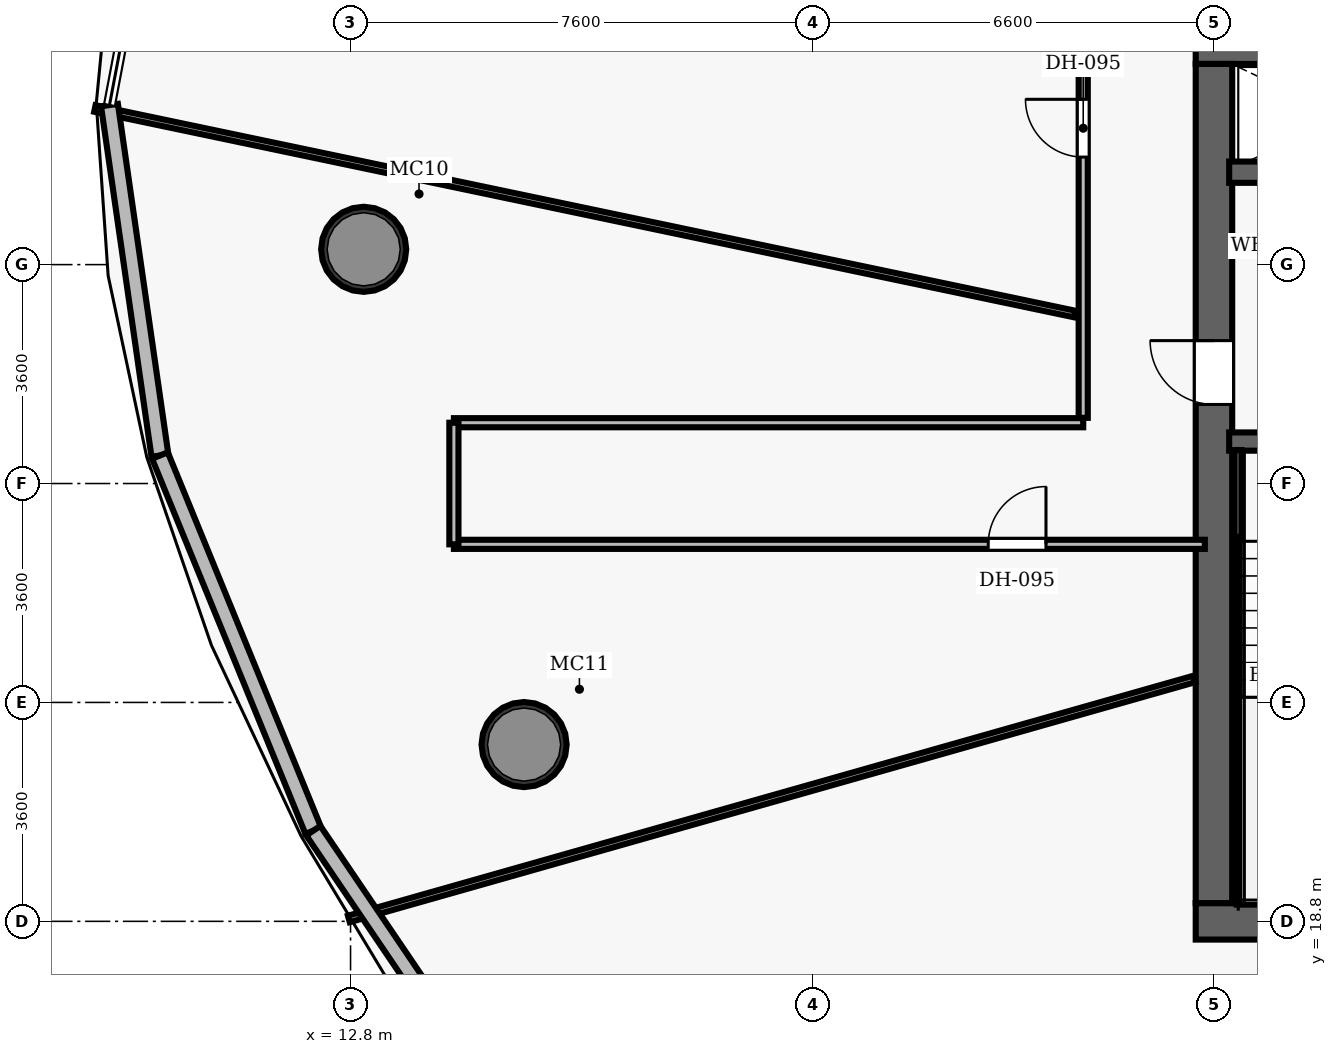
"""IFC4 building model, lengths in metres.
Left out: names, types, materials, properties, quantities, classifications, styles, units other than length and angle.
Written with IfcOpenShell. Run it as: python <this file> out.ifc"""

import sys

from ifc_helpers import new_model, si_unit, direction, frame, frame_2d, origin, origin_2d, place, context, subcontext, project, spatial, rectangle, hollow_circle, extrude, element, fill, save


model = new_model("IFC4")
c1 = context("Model", 3, precision=1e-05, world=origin(), true_north=direction((0.0, 1.0)))
c2 = subcontext(c1, "Body", "Model", "MODEL_VIEW")
j1 = project(units=[si_unit("LENGTHUNIT", "METRE"), si_unit("PLANEANGLEUNIT", "RADIAN")], contexts=[c1])
p1 = place(None, origin())
s1 = spatial("IfcSite", under=j1, at=p1, CompositionType="ELEMENT")
p2 = place(p1, origin())
s2 = spatial("IfcBuilding", under=s1, at=p2, CompositionType="ELEMENT")
p3 = place(p2, frame((0.0, 0.0, 120.3)))
s3 = spatial("IfcBuildingStorey", under=s2, at=p3, CompositionType="ELEMENT", Elevation=120.3)
p4 = place(p3, frame((26.7, 18.8, 0.0), z_axis=(0.0, 0.0, 1.0), x_axis=(1.0, 0.0, 0.0)))
e1 = element("IfcWall", 1, at=p4, inside=s3, PredefinedType="SHEAR", context=c2, shape_type="SweptSolid", body=[
    extrude(rectangle(XDim=22.6, YDim=0.6, at=frame_2d((11.3, 0.0))), origin(), (0.0, 0.0, 1.0), 3.5),
])
p5 = place(p4, frame((14.52, 0.0, 0.0)))
e2 = element("IfcOpeningElement", 2, at=p5, cuts=e1, PredefinedType="OPENING", context=c2, shape_type="SweptSolid", body=[
    extrude(rectangle(XDim=1.05, YDim=2.15, at=frame_2d((0.525, 1.075))), frame((0.0, 0.31, 0.0), z_axis=(0.0, -1.0, 0.0), x_axis=(1.0, 0.0, 0.0)), (0.0, 0.0, 1.0), 0.62),
])
p6 = place(p3, frame((26.7, 33.2, 0.0), z_axis=(0.0, 0.0, 1.0), x_axis=(1.0, 0.0, 0.0)))
e3 = element("IfcWall", 3, at=p6, inside=s3, PredefinedType="SHEAR", context=c2, shape_type="SweptSolid", body=[
    extrude(rectangle(XDim=22.6, YDim=0.6, at=frame_2d((11.3, 0.0))), origin(), (0.0, 0.0, 1.0), 3.5),
])
p7 = place(p6, frame((4.62, 0.0, 0.0)))
e4 = element("IfcOpeningElement", 4, at=p7, cuts=e3, PredefinedType="OPENING", context=c2, shape_type="SweptSolid", body=[
    extrude(rectangle(XDim=1.05, YDim=2.15, at=frame_2d((0.525, 1.075))), frame((0.0, 0.31, 0.0), z_axis=(0.0, -1.0, 0.0), x_axis=(1.0, 0.0, 0.0)), (0.0, 0.0, 1.0), 0.62),
])
p8 = place(p6, frame((14.52, 0.0, 0.0)))
e5 = element("IfcOpeningElement", 5, at=p8, cuts=e3, PredefinedType="OPENING", context=c2, shape_type="SweptSolid", body=[
    extrude(rectangle(XDim=1.05, YDim=2.15, at=frame_2d((0.525, 1.075))), frame((0.0, 0.31, 0.0), z_axis=(0.0, -1.0, 0.0), x_axis=(1.0, 0.0, 0.0)), (0.0, 0.0, 1.0), 0.62),
])
p9 = place(p3, frame((27.0, 19.1, 0.0), z_axis=(0.0, 0.0, 1.0), x_axis=(0.0, 1.0, 0.0)))
e6 = element("IfcWall", 6, at=p9, inside=s3, PredefinedType="SHEAR", context=c2, shape_type="SweptSolid", body=[
    extrude(rectangle(XDim=13.8, YDim=0.6, at=frame_2d((6.9, 0.0))), origin(), (0.0, 0.0, 1.0), 3.5),
])
p10 = place(p9, frame((8.2, 0.0, 0.0)))
e7 = element("IfcOpeningElement", 7, at=p10, cuts=e6, PredefinedType="OPENING", context=c2, shape_type="SweptSolid", body=[
    extrude(rectangle(XDim=1.05, YDim=2.15, at=frame_2d((0.525, 1.075))), frame((0.0, 0.31, 0.0), z_axis=(0.0, -1.0, 0.0), x_axis=(1.0, 0.0, 0.0)), (0.0, 0.0, 1.0), 0.62),
])
for number, where, z_axis, x_axis in (
    (8, (13.016, 29.852, 0.0), (0.0, 0.0, 1.0), (1.0, 0.0, 0.0)),
    (9, (15.654, 21.707, 0.0), (0.0, 0.0, 1.0), (1.0, 0.0, 0.0)),
):
    element("IfcColumn", number, at=place(p3, frame(where, z_axis=z_axis, x_axis=x_axis)), inside=s3, PredefinedType="COLUMN", context=c2, shape_type="SweptSolid", body=[
        extrude(hollow_circle(Radius=0.7, WallThickness=0.055, at=origin_2d()), origin(), (0.0, 0.0, 1.0), 3.5),
    ])
p11 = place(p3, frame((27.25, 26.69, 0.0), z_axis=(0.0, 0.0, 1.0), x_axis=(1.0, 0.0, 0.0)))
e10 = element("IfcWall", 10, at=p11, inside=s3, PredefinedType="SHEAR", context=c2, shape_type="SweptSolid", body=[
    extrude(rectangle(XDim=3.67, YDim=0.3, at=frame_2d((1.835, 0.0))), origin(), (0.0, 0.0, 1.0), 3.5),
])
p12 = place(p11, frame((1.05, 0.0, 0.0)))
e11 = element("IfcOpeningElement", 11, at=p12, cuts=e10, PredefinedType="OPENING", context=c2, shape_type="SweptSolid", body=[
    extrude(rectangle(XDim=1.1, YDim=2.15, at=frame_2d((0.55, 1.075))), frame((0.0, 0.16, 0.0), z_axis=(0.0, -1.0, 0.0), x_axis=(1.0, 0.0, 0.0)), (0.0, 0.0, 1.0), 0.32),
])
p13 = place(p3, frame((27.395, 19.1, 0.0), z_axis=(0.0, 0.0, 1.0), x_axis=(0.0, 1.0, 0.0)))
e12 = element("IfcWall", 12, at=p13, inside=s3, PredefinedType="SHEAR", context=c2, shape_type="SweptSolid", body=[
    extrude(rectangle(XDim=7.45, YDim=0.12, at=frame_2d((3.725, 0.0))), origin(), (0.0, 0.0, 1.0), 3.5),
])
p14 = place(p3, frame((27.395, 19.16, 0.0), z_axis=(0.0, 0.0, 1.0), x_axis=(1.0, 0.0, 0.0)))
e13 = element("IfcWall", 13, at=p14, inside=s3, PredefinedType="SHEAR", context=c2, shape_type="SweptSolid", body=[
    extrude(rectangle(XDim=3.095, YDim=0.12, at=frame_2d((1.547, 0.0))), origin(), (0.0, 0.0, 1.0), 3.5),
])
p15 = place(p3, frame((27.25, 31.12, 0.0), z_axis=(0.0, 0.0, 1.0), x_axis=(1.0, 0.0, 0.0)))
e14 = element("IfcWall", 14, at=p15, inside=s3, PredefinedType="SHEAR", context=c2, shape_type="SweptSolid", body=[
    extrude(rectangle(XDim=3.67, YDim=0.35, at=frame_2d((1.835, 0.0))), origin(), (0.0, 0.0, 1.0), 2.675),
])
p16 = place(p15, frame((1.25, 0.0, 0.0)))
e15 = element("IfcOpeningElement", 15, at=p16, cuts=e14, PredefinedType="OPENING", context=c2, shape_type="SweptSolid", body=[
    extrude(rectangle(XDim=1.1, YDim=2.15, at=frame_2d((0.55, 1.075))), frame((0.0, 0.185, 0.0), z_axis=(0.0, -1.0, 0.0), x_axis=(1.0, 0.0, 0.0)), (0.0, 0.0, 1.0), 0.37),
])
p17 = place(p3, frame((24.85, 27.08, 0.0), z_axis=(0.0, 0.0, 1.0), x_axis=(0.0, 1.0, 0.0)))
e16 = element("IfcWall", 16, at=p17, inside=s3, PredefinedType="PARTITIONING", context=c2, shape_type="SweptSolid", body=[
    extrude(rectangle(XDim=8.12, YDim=0.15, at=frame_2d((4.06, 0.0))), origin(), (0.0, 0.0, 1.0), 2.675),
])
p18 = place(p17, frame((4.288, 0.0, 0.0)))
e17 = element("IfcOpeningElement", 17, at=p18, cuts=e16, PredefinedType="OPENING", context=c2, shape_type="SweptSolid", body=[
    extrude(rectangle(XDim=0.95, YDim=2.15, at=frame_2d((0.475, 1.075))), frame((0.0, 0.085, 0.0), z_axis=(0.0, -1.0, 0.0), x_axis=(1.0, 0.0, 0.0)), (0.0, 0.0, 1.0), 0.17),
])
p19 = place(p3, frame((14.5, 27.0, 0.0), z_axis=(0.0, 0.0, 1.0), x_axis=(1.0, 0.0, 0.0)))
e18 = element("IfcWall", 18, at=p19, inside=s3, PredefinedType="PARTITIONING", context=c2, shape_type="SweptSolid", body=[
    extrude(rectangle(XDim=10.35, YDim=0.15, at=frame_2d((5.175, 0.0))), origin(), (0.0, 0.0, 1.0), 2.675),
])
p20 = place(p3, frame((14.5, 25.0, 0.0), z_axis=(0.0, 0.0, 1.0), x_axis=(1.0, 0.0, 0.0)))
e19 = element("IfcWall", 19, at=p20, inside=s3, PredefinedType="PARTITIONING", context=c2, shape_type="SweptSolid", body=[
    extrude(rectangle(XDim=12.35, YDim=0.15, at=frame_2d((6.175, 0.0))), origin(), (0.0, 0.0, 1.0), 2.675),
])
p21 = place(p20, frame((8.788, 0.0, 0.0)))
e20 = element("IfcOpeningElement", 20, at=p21, cuts=e19, PredefinedType="OPENING", context=c2, shape_type="SweptSolid", body=[
    extrude(rectangle(XDim=0.95, YDim=2.15, at=frame_2d((0.475, 1.075))), frame((0.0, 0.085, 0.0), z_axis=(0.0, -1.0, 0.0), x_axis=(1.0, 0.0, 0.0)), (0.0, 0.0, 1.0), 0.17),
])
p22 = place(p3, frame((14.5, 25.0, 0.0), z_axis=(0.0, 0.0, 1.0), x_axis=(0.0, 1.0, 0.0)))
e21 = element("IfcWall", 21, at=p22, inside=s3, PredefinedType="PARTITIONING", context=c2, shape_type="SweptSolid", body=[
    extrude(rectangle(XDim=2.0, YDim=0.15, at=frame_2d((1.0, 0.0))), origin(), (0.0, 0.0, 1.0), 2.675),
])
p23 = place(p3, frame((24.71, 28.788, 0.0), z_axis=(0.0, 0.0, 1.0), x_axis=(-0.978701960767, 0.205286317105, 0.0)))
e22 = element("IfcWall", 22, at=p23, inside=s3, PredefinedType="PARTITIONING", context=c2, shape_type="SweptSolid", body=[
    extrude(rectangle(XDim=16.465, YDim=0.11, at=frame_2d((8.233, 0.0))), origin(), (0.0, 0.0, 1.0), 2.675),
])
p24 = place(p3, frame((26.68, 22.787, 0.0), z_axis=(0.0, 0.0, 1.0), x_axis=(-0.961996623754, -0.273061340883, 0.0)))
e23 = element("IfcWall", 23, at=p24, inside=s3, PredefinedType="PARTITIONING", context=c2, shape_type="SweptSolid", body=[
    extrude(rectangle(XDim=14.457, YDim=0.11, at=frame_2d((7.229, 0.0))), origin(), (0.0, 0.0, 1.0), 2.675),
])
p25 = place(p3, frame((30.086, 18.48, 0.0), z_axis=(0.0, 0.0, 1.0), x_axis=(-0.724915865707, -0.688837417426, 0.0)))
e24 = element("IfcWall", 24, at=p25, inside=s3, PredefinedType="PARTITIONING", context=c2, shape_type="SweptSolid", body=[
    extrude(rectangle(XDim=12.911, YDim=0.11, at=frame_2d((6.456, 0.0))), origin(), (0.0, 0.0, 1.0), 2.675),
])
p26 = place(p3, frame((9.665, 26.46, 0.0), z_axis=(0.0, 0.0, 1.0), x_axis=(-0.142471997075, 0.989798833122, 0.0)))
e25 = element("IfcWall", 25, at=p26, inside=s3, PredefinedType="SOLIDWALL", context=c2, shape_type="SweptSolid", body=[
    extrude(rectangle(XDim=5.823, YDim=0.28, at=frame_2d((2.911, 0.0))), origin(), (0.0, 0.0, 1.0), 3.26),
])
p27 = place(p3, frame((12.188, 20.291, 0.0), z_axis=(0.0, 0.0, 1.0), x_axis=(-0.378465960246, 0.925615209974, 0.0)))
e26 = element("IfcWall", 26, at=p27, inside=s3, PredefinedType="SOLIDWALL", context=c2, shape_type="SweptSolid", body=[
    extrude(rectangle(XDim=6.665, YDim=0.28, at=frame_2d((3.333, 0.0))), origin(), (0.0, 0.0, 1.0), 3.26),
])
p28 = place(p3, frame((16.278, 14.255, 0.0), z_axis=(0.0, 0.0, 1.0), x_axis=(-0.56098139496, 0.827828408856, 0.0)))
e27 = element("IfcWall", 27, at=p28, inside=s3, PredefinedType="SOLIDWALL", context=c2, shape_type="SweptSolid", body=[
    extrude(rectangle(XDim=7.292, YDim=0.28, at=frame_2d((3.646, 0.0))), origin(), (0.0, 0.0, 1.0), 3.26),
])
p29 = place(p10, origin())
e28 = element("IfcDoor", 28, at=p29, inside=s3, OperationType="SINGLE_SWING_RIGHT", PredefinedType="DOOR", context=c2, shape_type="SweptSolid", body=[
    extrude(rectangle(XDim=1.05, YDim=2.15, at=frame_2d((0.525, 1.075))), frame((0.0, 0.025, 0.0), z_axis=(0.0, -1.0, 0.0), x_axis=(1.0, 0.0, 0.0)), (0.0, 0.0, 1.0), 0.05),
])
fill(e7, e28)
p30 = place(p18, origin())
e29 = element("IfcDoor", 29, at=p30, inside=s3, OperationType="SINGLE_SWING_RIGHT", PredefinedType="DOOR", context=c2, shape_type="SweptSolid", body=[
    extrude(rectangle(XDim=0.95, YDim=2.15, at=frame_2d((0.475, 1.075))), frame((0.0, 0.025, 0.0), z_axis=(0.0, -1.0, 0.0), x_axis=(1.0, 0.0, 0.0)), (0.0, 0.0, 1.0), 0.05),
])
fill(e17, e29)
p31 = place(p21, origin())
e30 = element("IfcDoor", 30, at=p31, inside=s3, OperationType="SINGLE_SWING_RIGHT", PredefinedType="DOOR", context=c2, shape_type="SweptSolid", body=[
    extrude(rectangle(XDim=0.95, YDim=2.15, at=frame_2d((0.475, 1.075))), frame((0.0, 0.025, 0.0), z_axis=(0.0, -1.0, 0.0), x_axis=(1.0, 0.0, 0.0)), (0.0, 0.0, 1.0), 0.05),
])
fill(e20, e30)
save(model, sys.argv[1])
